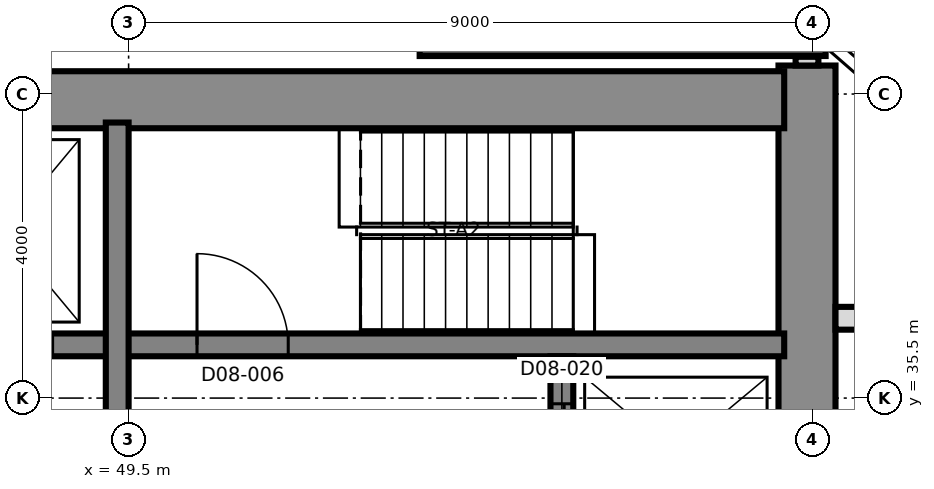
"""IFC4 building model, lengths in metres.
Left out: names, types, materials, properties, quantities, classifications, styles, units other than length and angle.
Written with IfcOpenShell. Run it as: python <this file> out.ifc"""

import sys

from ifc_helpers import new_model, si_unit, direction, frame, frame_2d, origin, place, context, subcontext, project, spatial, rectangle, extrude, element, fill, save


model = new_model("IFC4")
c1 = context("Model", 3, precision=1e-05, world=origin(), true_north=direction((0.0, 1.0)))
c2 = subcontext(c1, "Body", "Model", "MODEL_VIEW")
j1 = project(units=[si_unit("LENGTHUNIT", "METRE"), si_unit("PLANEANGLEUNIT", "RADIAN")], contexts=[c1])
p1 = place(None, origin())
s1 = spatial("IfcSite", under=j1, at=p1, CompositionType="ELEMENT")
p2 = place(p1, origin())
s2 = spatial("IfcBuilding", under=s1, at=p2, CompositionType="ELEMENT")
p3 = place(p2, frame((0.0, 0.0, 98.2)))
s3 = spatial("IfcBuildingStorey", under=s2, at=p3, CompositionType="ELEMENT", Elevation=98.2)
p4 = place(p3, frame((58.425, 21.125, 0.0), z_axis=(0.0, 0.0, 1.0), x_axis=(0.0, 1.0, 0.0)))
e1 = element("IfcWall", 1, at=p4, inside=s3, PredefinedType="SHEAR", context=c2, shape_type="SweptSolid", body=[
    extrude(rectangle(XDim=18.75, YDim=0.75, at=frame_2d((9.375, 0.0))), origin(), (0.0, 0.0, 1.0), 3.7),
])
p5 = place(p4, frame((10.275, 0.0, 0.0)))
e2 = element("IfcOpeningElement", 2, at=p5, cuts=e1, PredefinedType="OPENING", context=c2, shape_type="SweptSolid", body=[
    extrude(rectangle(XDim=1.2, YDim=2.1, at=frame_2d((0.6, 1.05))), frame((0.0, 0.385, 0.0), z_axis=(0.0, -1.0, 0.0), x_axis=(1.0, 0.0, 0.0)), (0.0, 0.0, 1.0), 0.77),
])
p6 = place(p3, frame((31.125, 39.425, 0.0), z_axis=(0.0, 0.0, 1.0), x_axis=(1.0, 0.0, 0.0)))
e3 = element("IfcWall", 3, at=p6, inside=s3, PredefinedType="SHEAR", context=c2, shape_type="SweptSolid", body=[
    extrude(rectangle(XDim=27.0, YDim=0.75, at=frame_2d((13.5, 0.0))), origin(), (0.0, 0.0, 1.0), 3.7),
])
p7 = place(p6, frame((10.575, 0.0, 0.0)))
e4 = element("IfcOpeningElement", 4, at=p7, cuts=e3, PredefinedType="OPENING", context=c2, shape_type="SweptSolid", body=[
    extrude(rectangle(XDim=1.2, YDim=2.1, at=frame_2d((0.6, 1.05))), frame((0.0, 0.385, 0.0), z_axis=(0.0, -1.0, 0.0), x_axis=(1.0, 0.0, 0.0)), (0.0, 0.0, 1.0), 0.77),
])
p8 = place(p3, frame((43.5, 36.2, 0.0), z_axis=(0.0, 0.0, 1.0), x_axis=(1.0, 0.0, 0.0)))
e5 = element("IfcWall", 5, at=p8, inside=s3, PredefinedType="SHEAR", context=c2, shape_type="SweptSolid", body=[
    extrude(rectangle(XDim=14.625, YDim=0.3, at=frame_2d((7.312, 0.0))), origin(), (0.0, 0.0, 1.0), 3.7),
])
p9 = place(p8, frame((6.9, 0.0, 0.0)))
e6 = element("IfcOpeningElement", 6, at=p9, cuts=e5, PredefinedType="OPENING", context=c2, shape_type="SweptSolid", body=[
    extrude(rectangle(XDim=1.2, YDim=2.1, at=frame_2d((0.6, 1.05))), frame((0.0, 0.16, 0.0), z_axis=(0.0, -1.0, 0.0), x_axis=(1.0, 0.0, 0.0)), (0.0, 0.0, 1.0), 0.32),
])
p10 = place(p8, frame((0.7, 0.0, 0.0)))
e7 = element("IfcOpeningElement", 7, at=p10, cuts=e5, PredefinedType="OPENING", context=c2, shape_type="SweptSolid", body=[
    extrude(rectangle(XDim=1.3, YDim=2.4, at=frame_2d((0.65, 1.2))), frame((0.0, 0.16, 0.0), z_axis=(0.0, -1.0, 0.0), x_axis=(1.0, 0.0, 0.0)), (0.0, 0.0, 1.0), 0.32),
])
p11 = place(p8, frame((3.7, 0.0, 0.0)))
e8 = element("IfcOpeningElement", 8, at=p11, cuts=e5, PredefinedType="OPENING", context=c2, shape_type="SweptSolid", body=[
    extrude(rectangle(XDim=1.3, YDim=2.4, at=frame_2d((0.65, 1.2))), frame((0.0, 0.16, 0.0), z_axis=(0.0, -1.0, 0.0), x_axis=(1.0, 0.0, 0.0)), (0.0, 0.0, 1.0), 0.32),
])
p12 = place(p3, frame((49.35, 33.5, 0.0), z_axis=(0.0, 0.0, 1.0), x_axis=(0.0, 1.0, 0.0)))
e9 = element("IfcWall", 9, at=p12, inside=s3, PredefinedType="SHEAR", context=c2, shape_type="SweptSolid", body=[
    extrude(rectangle(XDim=5.625, YDim=0.3, at=frame_2d((2.812, 0.0))), origin(), (0.0, 0.0, 1.0), 3.7),
])
p13 = place(p3, frame((55.2, 33.5, 0.0), z_axis=(0.0, 0.0, 1.0), x_axis=(0.0, 1.0, 0.0)))
e10 = element("IfcWall", 10, at=p13, inside=s3, PredefinedType="SHEAR", context=c2, shape_type="SweptSolid", body=[
    extrude(rectangle(XDim=2.55, YDim=0.3, at=frame_2d((1.275, 0.0))), origin(), (0.0, 0.0, 1.0), 3.7),
])
p14 = place(p13, frame((0.625, 0.0, 0.0)))
e11 = element("IfcOpeningElement", 11, at=p14, cuts=e10, PredefinedType="OPENING", context=c2, shape_type="SweptSolid", body=[
    extrude(rectangle(XDim=1.3, YDim=2.4, at=frame_2d((0.65, 1.2))), frame((0.0, 0.16, 0.0), z_axis=(0.0, -1.0, 0.0), x_axis=(1.0, 0.0, 0.0)), (0.0, 0.0, 1.0), 0.32),
])
p15 = place(p3, frame((58.67, 40.15, 0.0), z_axis=(0.0, 0.0, 1.0), x_axis=(-1.0, 0.0, 0.0)))
e12 = element("IfcWall", 12, at=p15, inside=s3, PredefinedType="SOLIDWALL", context=c2, shape_type="SweptSolid", body=[
    extrude(rectangle(XDim=5.341, YDim=0.3, at=frame_2d((2.67, 0.0))), origin(), (0.0, 0.0, 1.0), 3.4),
])
p16 = place(p3, frame((58.8, 36.55, 0.0), z_axis=(0.0, 0.0, 1.0), x_axis=(1.0, 0.0, 0.0)))
e13 = element("IfcWall", 13, at=p16, inside=s3, PredefinedType="PARTITIONING", context=c2, shape_type="SweptSolid", body=[
    extrude(rectangle(XDim=2.4, YDim=0.3, at=frame_2d((1.2, 0.0))), origin(), (0.0, 0.0, 1.0), 3.4),
])
p17 = place(p16, frame((0.65, 0.0, 0.0)))
e14 = element("IfcOpeningElement", 14, at=p17, cuts=e13, PredefinedType="OPENING", context=c2, shape_type="SweptSolid", body=[
    extrude(rectangle(XDim=0.8, YDim=2.1, at=frame_2d((0.4, 1.05))), frame((0.0, 0.16, 0.0), z_axis=(0.0, -1.0, 0.0), x_axis=(1.0, 0.0, 0.0)), (0.0, 0.0, 1.0), 0.32),
])
p18 = place(p3, frame((58.425, 39.875, 0.0), z_axis=(0.0, 0.0, 1.0), x_axis=(0.0, 1.0, 0.0)))
e15 = element("IfcWall", 15, at=p18, inside=s3, PredefinedType="PARTITIONING", context=c2, shape_type="SweptSolid", body=[
    extrude(rectangle(XDim=0.115, YDim=0.3, at=frame_2d((0.058, 0.0))), origin(), (0.0, 0.0, 1.0), 3.4),
])
p19 = place(p9, origin())
e16 = element("IfcDoor", 16, at=p19, inside=s3, OperationType="SINGLE_SWING_LEFT", PredefinedType="DOOR", context=c2, shape_type="SweptSolid", body=[
    extrude(rectangle(XDim=1.2, YDim=2.1, at=frame_2d((0.6, 1.05))), frame((0.0, 0.025, 0.0), z_axis=(0.0, -1.0, 0.0), x_axis=(1.0, 0.0, 0.0)), (0.0, 0.0, 1.0), 0.05),
])
fill(e6, e16)
p20 = place(p14, origin())
e17 = element("IfcDoor", 17, at=p20, inside=s3, OperationType="SLIDING_TO_LEFT", PredefinedType="DOOR", context=c2, shape_type="SweptSolid", body=[
    extrude(rectangle(XDim=1.3, YDim=2.4, at=frame_2d((0.65, 1.2))), frame((0.0, 0.025, 0.0), z_axis=(0.0, -1.0, 0.0), x_axis=(1.0, 0.0, 0.0)), (0.0, 0.0, 1.0), 0.05),
])
fill(e11, e17)
save(model, sys.argv[1])
